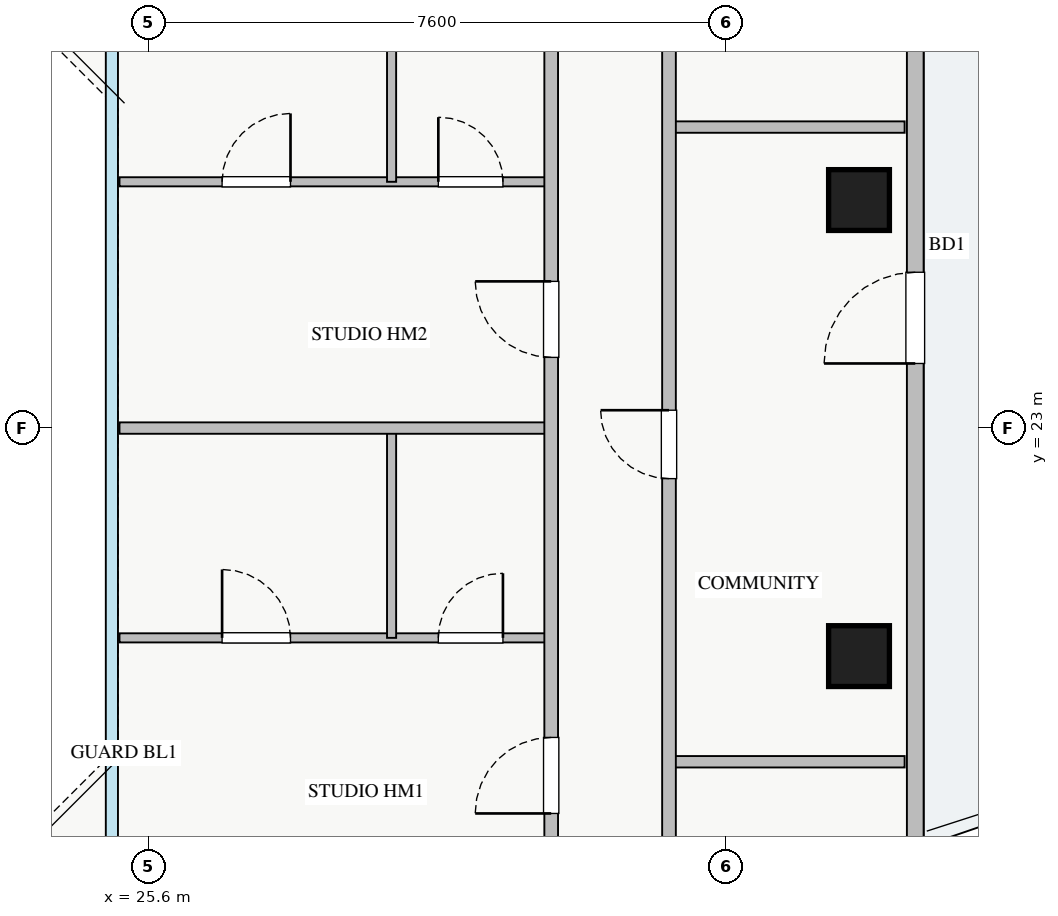
"""IFC4 building model, lengths in metres.
Left out: names, types, materials, properties, quantities, classifications, styles, units other than length and angle.
Written with IfcOpenShell. Run it as: python <this file> out.ifc"""

import sys

from ifc_helpers import new_model, si_unit, direction, frame, frame_2d, origin, origin_2d, place, context, subcontext, project, spatial, rectangle, extrude, source, transform, mapped, element, fill, save


model = new_model("IFC4")
c1 = context("Model", 3, precision=1e-05, world=origin(), true_north=direction((0.0, 1.0)))
c2 = subcontext(c1, "Body", "Model", "MODEL_VIEW")
j1 = project(units=[si_unit("LENGTHUNIT", "METRE"), si_unit("PLANEANGLEUNIT", "RADIAN")], contexts=[c1])
p1 = place(None, origin())
s1 = spatial("IfcSite", under=j1, at=p1, CompositionType="ELEMENT")
p2 = place(p1, origin())
s2 = spatial("IfcBuilding", under=s1, at=p2, CompositionType="ELEMENT")
p3 = place(p2, frame((0.0, 0.0, 206.75)))
s3 = spatial("IfcBuildingStorey", under=s2, at=p3, CompositionType="ELEMENT", Elevation=206.75)
m1 = source(origin(), c2, "Body", "SweptSolid", [
    extrude(rectangle(XDim=0.8, YDim=0.8, at=origin_2d()), origin(), (0.0, 0.0, 1.0), 3.25),
])
for number, where, z_axis, x_axis in (
    (1, (34.95, 20.0, 0.0), (0.0, 0.0, 1.0), (1.0, 0.0, 0.0)),
    (2, (34.95, 26.0, 0.0), (0.0, 0.0, 1.0), (1.0, 0.0, 0.0)),
):
    element("IfcColumn", number, at=place(p3, frame(where, z_axis=z_axis, x_axis=x_axis)), inside=s3, PredefinedType="COLUMN", context=c2, shape_type="MappedRepresentation", body=[
        mapped(m1, transform((0.0, 0.0, 0.0), x_axis=(1.0, 0.0, 0.0), y_axis=(0.0, 1.0, 0.0), z_axis=(0.0, 0.0, 1.0), scale=1.0)),
    ])
p4 = place(p3, frame((35.69, 11.65, 0.0), z_axis=(0.0, 0.0, 1.0), x_axis=(0.0, 1.0, 0.0)))
e3 = element("IfcWall", 3, at=p4, inside=s3, PredefinedType="STANDARD", context=c2, shape_type="SweptSolid", body=[
    extrude(rectangle(XDim=22.7, YDim=0.22, at=frame_2d((11.35, 0.0))), origin(), (0.0, 0.0, 1.0), 2.61),
])
p5 = place(p4, frame((12.2, 0.0, 0.0)))
e4 = element("IfcOpeningElement", 4, at=p5, cuts=e3, PredefinedType="OPENING", context=c2, shape_type="SweptSolid", body=[
    extrude(rectangle(XDim=1.2, YDim=2.1, at=frame_2d((0.6, 1.05))), frame((0.0, 0.12, 0.0), z_axis=(0.0, -1.0, 0.0), x_axis=(1.0, 0.0, 0.0)), (0.0, 0.0, 1.0), 0.24),
])
p6 = place(p4, frame((1.638, 0.0, 0.9)))
e5 = element("IfcOpeningElement", 5, at=p6, cuts=e3, PredefinedType="OPENING", context=c2, shape_type="SweptSolid", body=[
    extrude(rectangle(XDim=2.4, YDim=1.48, at=frame_2d((1.2, 0.74))), frame((0.0, 0.12, 0.0), z_axis=(0.0, -1.0, 0.0), x_axis=(1.0, 0.0, 0.0)), (0.0, 0.0, 1.0), 0.24),
])
p7 = place(p4, frame((18.813, 0.0, 0.9)))
e6 = element("IfcOpeningElement", 6, at=p7, cuts=e3, PredefinedType="OPENING", context=c2, shape_type="SweptSolid", body=[
    extrude(rectangle(XDim=2.1, YDim=1.48, at=frame_2d((1.05, 0.74))), frame((0.0, 0.12, 0.0), z_axis=(0.0, -1.0, 0.0), x_axis=(1.0, 0.0, 0.0)), (0.0, 0.0, 1.0), 0.24),
])
p8 = place(p3, frame((25.22, 20.24, 0.0), z_axis=(0.0, 0.0, 1.0), x_axis=(1.0, 0.0, 0.0)))
e7 = element("IfcWall", 7, at=p8, inside=s3, PredefinedType="PLUMBINGWALL", context=c2, shape_type="SweptSolid", body=[
    extrude(rectangle(XDim=5.68, YDim=0.12, at=frame_2d((2.84, 0.0))), origin(), (0.0, 0.0, 1.0), 2.675),
])
p9 = place(p8, frame((1.35, 0.0, 0.0)))
e8 = element("IfcOpeningElement", 8, at=p9, cuts=e7, PredefinedType="OPENING", context=c2, shape_type="SweptSolid", body=[
    extrude(rectangle(XDim=0.9, YDim=2.05, at=frame_2d((0.45, 1.025))), frame((0.0, 0.07, 0.0), z_axis=(0.0, -1.0, 0.0), x_axis=(1.0, 0.0, 0.0)), (0.0, 0.0, 1.0), 0.14),
])
p10 = place(p8, frame((4.195, 0.0, 0.0)))
e9 = element("IfcOpeningElement", 9, at=p10, cuts=e7, PredefinedType="OPENING", context=c2, shape_type="SweptSolid", body=[
    extrude(rectangle(XDim=0.85, YDim=2.05, at=frame_2d((0.425, 1.025))), frame((0.0, 0.07, 0.0), z_axis=(0.0, -1.0, 0.0), x_axis=(1.0, 0.0, 0.0)), (0.0, 0.0, 1.0), 0.14),
])
p11 = place(p3, frame((28.8, 20.24, 0.0), z_axis=(0.0, 0.0, 1.0), x_axis=(0.0, 1.0, 0.0)))
e10 = element("IfcWall", 10, at=p11, inside=s3, PredefinedType="PLUMBINGWALL", context=c2, shape_type="SweptSolid", body=[
    extrude(rectangle(XDim=2.76, YDim=0.12, at=frame_2d((1.38, 0.0))), origin(), (0.0, 0.0, 1.0), 3.07),
])
p12 = place(p3, frame((25.22, 26.24, 0.0), z_axis=(0.0, 0.0, 1.0), x_axis=(1.0, 0.0, 0.0)))
e11 = element("IfcWall", 11, at=p12, inside=s3, PredefinedType="PLUMBINGWALL", context=c2, shape_type="SweptSolid", body=[
    extrude(rectangle(XDim=5.68, YDim=0.12, at=frame_2d((2.84, 0.0))), origin(), (0.0, 0.0, 1.0), 2.675),
])
p13 = place(p12, frame((1.35, 0.0, 0.0)))
e12 = element("IfcOpeningElement", 12, at=p13, cuts=e11, PredefinedType="OPENING", context=c2, shape_type="SweptSolid", body=[
    extrude(rectangle(XDim=0.9, YDim=2.05, at=frame_2d((0.45, 1.025))), frame((0.0, 0.07, 0.0), z_axis=(0.0, -1.0, 0.0), x_axis=(1.0, 0.0, 0.0)), (0.0, 0.0, 1.0), 0.14),
])
p14 = place(p12, frame((4.195, 0.0, 0.0)))
e13 = element("IfcOpeningElement", 13, at=p14, cuts=e11, PredefinedType="OPENING", context=c2, shape_type="SweptSolid", body=[
    extrude(rectangle(XDim=0.85, YDim=2.05, at=frame_2d((0.425, 1.025))), frame((0.0, 0.07, 0.0), z_axis=(0.0, -1.0, 0.0), x_axis=(1.0, 0.0, 0.0)), (0.0, 0.0, 1.0), 0.14),
])
p15 = place(p3, frame((28.8, 26.24, 0.0), z_axis=(0.0, 0.0, 1.0), x_axis=(0.0, 1.0, 0.0)))
e14 = element("IfcWall", 14, at=p15, inside=s3, PredefinedType="PLUMBINGWALL", context=c2, shape_type="SweptSolid", body=[
    extrude(rectangle(XDim=2.76, YDim=0.12, at=frame_2d((1.38, 0.0))), origin(), (0.0, 0.0, 1.0), 3.07),
])
p16 = place(p3, frame((25.22, 23.0, 0.0), z_axis=(0.0, 0.0, 1.0), x_axis=(1.0, 0.0, 0.0)))
e15 = element("IfcWall", 15, at=p16, inside=s3, PredefinedType="PARTITIONING", context=c2, shape_type="SweptSolid", body=[
    extrude(rectangle(XDim=5.68, YDim=0.15, at=frame_2d((2.84, 0.0))), origin(), (0.0, 0.0, 1.0), 3.07),
])
p17 = place(p3, frame((30.9, 17.0, 0.0), z_axis=(0.0, 0.0, 1.0), x_axis=(0.0, 1.0, 0.0)))
e16 = element("IfcWall", 16, at=p17, inside=s3, PredefinedType="PARTITIONING", context=c2, shape_type="SweptSolid", body=[
    extrude(rectangle(XDim=12.0, YDim=0.18, at=frame_2d((6.0, 0.0))), origin(), (0.0, 0.0, 1.0), 3.07),
])
p18 = place(p17, frame((0.93, 0.0, 0.0)))
e17 = element("IfcOpeningElement", 17, at=p18, cuts=e16, PredefinedType="OPENING", context=c2, shape_type="SweptSolid", body=[
    extrude(rectangle(XDim=1.0, YDim=2.05, at=frame_2d((0.5, 1.025))), frame((0.0, 0.1, 0.0), z_axis=(0.0, -1.0, 0.0), x_axis=(1.0, 0.0, 0.0)), (0.0, 0.0, 1.0), 0.2),
])
p19 = place(p17, frame((6.93, 0.0, 0.0)))
e18 = element("IfcOpeningElement", 18, at=p19, cuts=e16, PredefinedType="OPENING", context=c2, shape_type="SweptSolid", body=[
    extrude(rectangle(XDim=1.0, YDim=2.05, at=frame_2d((0.5, 1.025))), frame((0.0, 0.1, 0.0), z_axis=(0.0, -1.0, 0.0), x_axis=(1.0, 0.0, 0.0)), (0.0, 0.0, 1.0), 0.2),
])
for number, where, z_axis, x_axis in (
    (19, (32.45, 18.61, 0.0), (0.0, 0.0, 1.0), (1.0, 0.0, 0.0)),
    (20, (32.45, 26.96, 0.0), (0.0, 0.0, 1.0), (1.0, 0.0, 0.0)),
):
    element("IfcWall", number, at=place(p3, frame(where, z_axis=z_axis, x_axis=x_axis)), inside=s3, PredefinedType="PARTITIONING", context=c2, shape_type="SweptSolid", body=[
        extrude(rectangle(XDim=3.1, YDim=0.15, at=frame_2d((1.55, 0.0))), origin(), (0.0, 0.0, 1.0), 3.07),
    ])
p20 = place(p3, frame((32.45, 11.12, 0.0), z_axis=(0.0, 0.0, 1.0), x_axis=(0.0, 1.0, 0.0)))
e21 = element("IfcWall", 21, at=p20, inside=s3, PredefinedType="PARTITIONING", context=c2, shape_type="SweptSolid", body=[
    extrude(rectangle(XDim=23.76, YDim=0.18, at=frame_2d((11.88, 0.0))), origin(), (0.0, 0.0, 1.0), 3.07),
])
p21 = place(p20, frame((3.295, 0.0, 0.0)))
e22 = element("IfcOpeningElement", 22, at=p21, cuts=e21, PredefinedType="OPENING", context=c2, shape_type="SweptSolid", body=[
    extrude(rectangle(XDim=0.9, YDim=2.05, at=frame_2d((0.45, 1.025))), frame((0.0, 0.1, 0.0), z_axis=(0.0, -1.0, 0.0), x_axis=(1.0, 0.0, 0.0)), (0.0, 0.0, 1.0), 0.2),
])
p22 = place(p20, frame((11.215, 0.0, 0.0)))
e23 = element("IfcOpeningElement", 23, at=p22, cuts=e21, PredefinedType="OPENING", context=c2, shape_type="SweptSolid", body=[
    extrude(rectangle(XDim=0.9, YDim=2.05, at=frame_2d((0.45, 1.025))), frame((0.0, 0.1, 0.0), z_axis=(0.0, -1.0, 0.0), x_axis=(1.0, 0.0, 0.0)), (0.0, 0.0, 1.0), 0.2),
])
p23 = place(p20, frame((19.35, 0.0, 0.0)))
e24 = element("IfcOpeningElement", 24, at=p23, cuts=e21, PredefinedType="OPENING", context=c2, shape_type="SweptSolid", body=[
    extrude(rectangle(XDim=0.9, YDim=2.05, at=frame_2d((0.45, 1.025))), frame((0.0, 0.1, 0.0), z_axis=(0.0, -1.0, 0.0), x_axis=(1.0, 0.0, 0.0)), (0.0, 0.0, 1.0), 0.2),
])
m2 = source(origin(), c2, "Body", "SweptSolid", [
    extrude(rectangle(XDim=1.2, YDim=2.1, at=frame_2d((0.6, 1.05))), frame((0.0, 0.025, 0.0), z_axis=(0.0, -1.0, 0.0), x_axis=(1.0, 0.0, 0.0)), (0.0, 0.0, 1.0), 0.05),
])
p24 = place(p5, origin())
e25 = element("IfcDoor", 25, at=p24, inside=s3, OperationType="SINGLE_SWING_LEFT", PredefinedType="DOOR", context=c2, shape_type="MappedRepresentation", body=[
    mapped(m2, transform((0.0, 0.0, 0.0), x_axis=(1.0, 0.0, 0.0), y_axis=(0.0, 1.0, 0.0), z_axis=(0.0, 0.0, 1.0), scale=1.0)),
])
fill(e4, e25)
m3 = source(origin(), c2, "Body", "SweptSolid", [
    extrude(rectangle(XDim=0.9, YDim=2.05, at=frame_2d((0.45, 1.025))), frame((0.0, 0.025, 0.0), z_axis=(0.0, -1.0, 0.0), x_axis=(1.0, 0.0, 0.0)), (0.0, 0.0, 1.0), 0.05),
])
p25 = place(p9, origin())
e26 = element("IfcDoor", 26, at=p25, inside=s3, OperationType="SINGLE_SWING_LEFT", PredefinedType="DOOR", context=c2, shape_type="MappedRepresentation", body=[
    mapped(m3, transform((0.0, 0.0, 0.0), x_axis=(1.0, 0.0, 0.0), y_axis=(0.0, 1.0, 0.0), z_axis=(0.0, 0.0, 1.0), scale=1.0)),
])
fill(e8, e26)
m4 = source(origin(), c2, "Body", "SweptSolid", [
    extrude(rectangle(XDim=0.85, YDim=2.05, at=frame_2d((0.425, 1.025))), frame((0.0, 0.025, 0.0), z_axis=(0.0, -1.0, 0.0), x_axis=(1.0, 0.0, 0.0)), (0.0, 0.0, 1.0), 0.05),
])
p26 = place(p10, origin())
e27 = element("IfcDoor", 27, at=p26, inside=s3, OperationType="SINGLE_SWING_RIGHT", PredefinedType="DOOR", context=c2, shape_type="MappedRepresentation", body=[
    mapped(m4, transform((0.0, 0.0, 0.0), x_axis=(1.0, 0.0, 0.0), y_axis=(0.0, 1.0, 0.0), z_axis=(0.0, 0.0, 1.0), scale=1.0)),
])
fill(e9, e27)
p27 = place(p13, origin())
e28 = element("IfcDoor", 28, at=p27, inside=s3, OperationType="SINGLE_SWING_RIGHT", PredefinedType="DOOR", context=c2, shape_type="MappedRepresentation", body=[
    mapped(m3, transform((0.0, 0.0, 0.0), x_axis=(1.0, 0.0, 0.0), y_axis=(0.0, 1.0, 0.0), z_axis=(0.0, 0.0, 1.0), scale=1.0)),
])
fill(e12, e28)
p28 = place(p14, origin())
e29 = element("IfcDoor", 29, at=p28, inside=s3, OperationType="SINGLE_SWING_LEFT", PredefinedType="DOOR", context=c2, shape_type="MappedRepresentation", body=[
    mapped(m4, transform((0.0, 0.0, 0.0), x_axis=(1.0, 0.0, 0.0), y_axis=(0.0, 1.0, 0.0), z_axis=(0.0, 0.0, 1.0), scale=1.0)),
])
fill(e13, e29)
m5 = source(origin(), c2, "Body", "SweptSolid", [
    extrude(rectangle(XDim=1.0, YDim=2.05, at=frame_2d((0.5, 1.025))), frame((0.0, 0.025, 0.0), z_axis=(0.0, -1.0, 0.0), x_axis=(1.0, 0.0, 0.0)), (0.0, 0.0, 1.0), 0.05),
])
p29 = place(p18, origin())
e30 = element("IfcDoor", 30, at=p29, inside=s3, OperationType="SINGLE_SWING_LEFT", PredefinedType="DOOR", context=c2, shape_type="MappedRepresentation", body=[
    mapped(m5, transform((0.0, 0.0, 0.0), x_axis=(1.0, 0.0, 0.0), y_axis=(0.0, 1.0, 0.0), z_axis=(0.0, 0.0, 1.0), scale=1.0)),
])
fill(e17, e30)
p30 = place(p19, origin())
e31 = element("IfcDoor", 31, at=p30, inside=s3, OperationType="SINGLE_SWING_RIGHT", PredefinedType="DOOR", context=c2, shape_type="MappedRepresentation", body=[
    mapped(m5, transform((0.0, 0.0, 0.0), x_axis=(1.0, 0.0, 0.0), y_axis=(0.0, 1.0, 0.0), z_axis=(0.0, 0.0, 1.0), scale=1.0)),
])
fill(e18, e31)
p31 = place(p22, origin())
e32 = element("IfcDoor", 32, at=p31, inside=s3, OperationType="SINGLE_SWING_RIGHT", PredefinedType="DOOR", context=c2, shape_type="MappedRepresentation", body=[
    mapped(m3, transform((0.0, 0.0, 0.0), x_axis=(1.0, 0.0, 0.0), y_axis=(0.0, 1.0, 0.0), z_axis=(0.0, 0.0, 1.0), scale=1.0)),
])
fill(e23, e32)
save(model, sys.argv[1])
